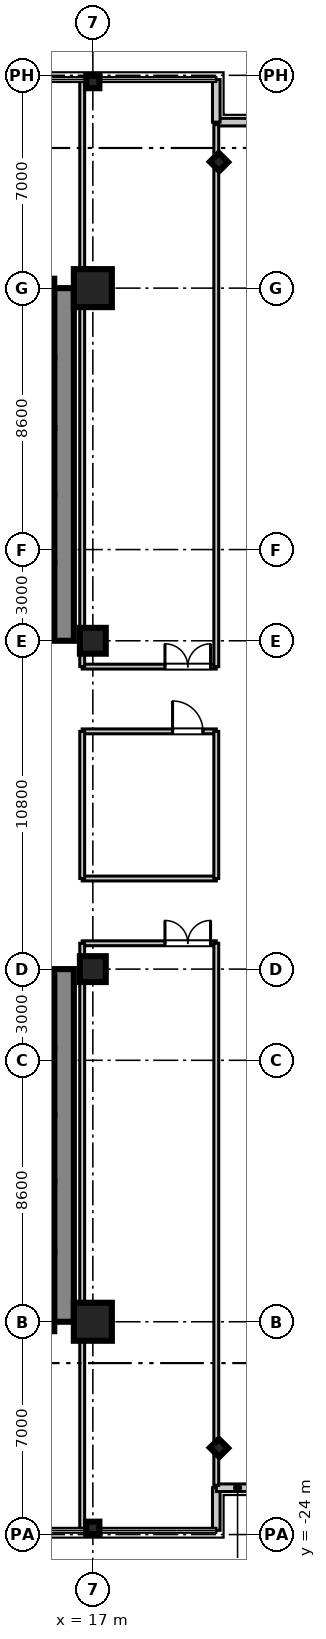
"""IFC4 building model, lengths in metres.
Left out: names, types, materials, properties, quantities, classifications, styles, units other than length and angle.
Written with IfcOpenShell. Run it as: python <this file> out.ifc"""

import sys

from ifc_helpers import new_model, si_unit, direction, frame, frame_2d, origin, origin_2d, place, context, subcontext, project, spatial, rectangle, i_section, extrude, source, transform, mapped, element, fill, save


model = new_model("IFC4")
c1 = context("Model", 3, precision=1e-05, world=origin(), true_north=direction((0.0, 1.0)))
c2 = subcontext(c1, "Body", "Model", "MODEL_VIEW")
j1 = project(units=[si_unit("LENGTHUNIT", "METRE"), si_unit("PLANEANGLEUNIT", "RADIAN")], contexts=[c1])
p1 = place(None, origin())
s1 = spatial("IfcSite", under=j1, at=p1, CompositionType="ELEMENT")
p2 = place(p1, origin())
s2 = spatial("IfcBuilding", under=s1, at=p2, CompositionType="ELEMENT")
p3 = place(p2, frame((0.0, 0.0, 110.2)))
s3 = spatial("IfcBuildingStorey", under=s2, at=p3, CompositionType="ELEMENT", Elevation=110.2)
m1 = source(origin(), c2, "Body", "SweptSolid", [
    extrude(rectangle(XDim=1.25, YDim=1.25, at=origin_2d()), origin(), (0.0, 0.0, 1.0), 3.605),
])
p4 = place(p3, frame((17.0, -17.0, 0.0), z_axis=(0.0, 0.0, 1.0), x_axis=(1.0, 0.0, 0.0)))
e1 = element("IfcColumn", 1, at=p4, inside=s3, PredefinedType="COLUMN", context=c2, shape_type="MappedRepresentation", body=[
    mapped(m1, transform((0.0, 0.0, 0.0), scale=1.0)),
])
m2 = source(origin(), c2, "Body", "SweptSolid", [
    extrude(rectangle(XDim=0.85, YDim=0.85, at=origin_2d()), origin(), (0.0, 0.0, 1.0), 3.605),
])
for number, where, z_axis, x_axis in (
    (2, (17.0, -5.4, 0.0), (0.0, 0.0, 1.0), (1.0, 0.0, 0.0)),
    (3, (17.0, 5.4, 0.0), (0.0, 0.0, 1.0), (1.0, 0.0, 0.0)),
):
    element("IfcColumn", number, at=place(p3, frame(where, z_axis=z_axis, x_axis=x_axis)), inside=s3, PredefinedType="PILASTER", context=c2, shape_type="MappedRepresentation", body=[
        mapped(m2, transform((0.0, 0.0, 0.0), scale=1.0)),
    ])
p5 = place(p3, frame((17.0, 17.0, 0.0), z_axis=(0.0, 0.0, 1.0), x_axis=(1.0, 0.0, 0.0)))
e4 = element("IfcColumn", 4, at=p5, inside=s3, PredefinedType="COLUMN", context=c2, shape_type="MappedRepresentation", body=[
    mapped(m1, transform((0.0, 0.0, 0.0), scale=1.0)),
])
m3 = source(origin(), c2, "Body", "SweptSolid", [
    extrude(i_section(OverallWidth=0.409, OverallDepth=0.43, WebThickness=0.021, FlangeThickness=0.034, at=origin_2d()), origin(), (0.0, 0.0, 1.0), 3.605),
])
for number, where, z_axis, x_axis in (
    (5, (17.0, -23.78, 0.0), (0.0, 0.0, 1.0), (0.0, 1.0, 0.0)),
    (6, (17.0, 23.78, 0.0), (0.0, 0.0, 1.0), (0.0, 1.0, 0.0)),
    (7, (21.15, -21.15, 0.0), (0.0, 0.0, 1.0), (0.707, 0.707, 0.0)),
    (8, (21.15, 21.15, 0.0), (0.0, 0.0, 1.0), (0.707, 0.707, 0.0)),
):
    element("IfcColumn", number, at=place(p3, frame(where, z_axis=z_axis, x_axis=x_axis)), inside=s3, PredefinedType="COLUMN", context=c2, shape_type="MappedRepresentation", body=[
        mapped(m3, transform((0.0, 0.0, 0.0), scale=1.0)),
    ])
m4 = source(origin(), c2, "Body", "SweptSolid", [
    extrude(rectangle(XDim=11.6, YDim=0.65, at=frame_2d((5.8, 0.0))), origin(), (0.0, 0.0, 1.0), 3.38),
])
for number, where, z_axis, x_axis in (
    (9, (16.05, 5.4, 0.0), (0.0, 0.0, 1.0), (0.0, 1.0, 0.0)),
    (10, (16.05, -17.0, 0.0), (0.0, 0.0, 1.0), (0.0, 1.0, 0.0)),
):
    element("IfcWall", number, at=place(p3, frame(where, z_axis=z_axis, x_axis=x_axis)), inside=s3, PredefinedType="SHEAR", context=c2, shape_type="MappedRepresentation", body=[
        mapped(m4, transform((0.0, 0.0, 0.0), scale=1.0)),
    ])
m5 = source(origin(), c2, "Body", "SweptSolid", [
    extrude(rectangle(XDim=2.36, YDim=0.22, at=frame_2d((1.18, 0.0))), origin(), (0.0, 0.0, 1.0), 3.38),
])
p6 = place(p3, frame((15.62, 5.64, 0.0), z_axis=(0.0, 0.0, 1.0), x_axis=(0.0, 1.0, 0.0)))
e11 = element("IfcWall", 11, at=p6, inside=s3, PredefinedType="SHEAR", context=c2, shape_type="MappedRepresentation", body=[
    mapped(m5, transform((0.0, 0.0, 0.0), scale=1.0)),
])
m6 = source(origin(), c2, "Body", "SweptSolid", [
    extrude(rectangle(XDim=2.2, YDim=0.22, at=frame_2d((1.1, 0.0))), origin(), (0.0, 0.0, 1.0), 3.38),
])
for number, where, z_axis, x_axis in (
    (12, (15.62, 8.0, 0.0), (0.0, 0.0, 1.0), (0.0, 1.0, 0.0)),
    (13, (15.62, 10.2, 0.0), (0.0, 0.0, 1.0), (0.0, 1.0, 0.0)),
):
    element("IfcWall", number, at=place(p3, frame(where, z_axis=z_axis, x_axis=x_axis)), inside=s3, PredefinedType="SHEAR", context=c2, shape_type="MappedRepresentation", body=[
        mapped(m6, transform((0.0, 0.0, 0.0), scale=1.0)),
    ])
m7 = source(origin(), c2, "Body", "SweptSolid", [
    extrude(rectangle(XDim=2.3, YDim=0.22, at=frame_2d((1.15, 0.0))), origin(), (0.0, 0.0, 1.0), 3.38),
])
p7 = place(p3, frame((15.62, 12.4, 0.0), z_axis=(0.0, 0.0, 1.0), x_axis=(0.0, 1.0, 0.0)))
e14 = element("IfcWall", 14, at=p7, inside=s3, PredefinedType="SHEAR", context=c2, shape_type="MappedRepresentation", body=[
    mapped(m7, transform((0.0, 0.0, 0.0), scale=1.0)),
])
p8 = place(p3, frame((15.62, -8.0, 0.0), z_axis=(0.0, 0.0, 1.0), x_axis=(0.0, 1.0, 0.0)))
e15 = element("IfcWall", 15, at=p8, inside=s3, PredefinedType="SHEAR", context=c2, shape_type="MappedRepresentation", body=[
    mapped(m5, transform((0.0, 0.0, 0.0), scale=1.0)),
])
for number, where, z_axis, x_axis in (
    (16, (15.62, -10.2, 0.0), (0.0, 0.0, 1.0), (0.0, 1.0, 0.0)),
    (17, (15.62, -12.4, 0.0), (0.0, 0.0, 1.0), (0.0, 1.0, 0.0)),
):
    element("IfcWall", number, at=place(p3, frame(where, z_axis=z_axis, x_axis=x_axis)), inside=s3, PredefinedType="SHEAR", context=c2, shape_type="MappedRepresentation", body=[
        mapped(m6, transform((0.0, 0.0, 0.0), scale=1.0)),
    ])
p9 = place(p3, frame((15.62, -14.7, 0.0), z_axis=(0.0, 0.0, 1.0), x_axis=(0.0, 1.0, 0.0)))
e18 = element("IfcWall", 18, at=p9, inside=s3, PredefinedType="SHEAR", context=c2, shape_type="MappedRepresentation", body=[
    mapped(m7, transform((0.0, 0.0, 0.0), scale=1.0)),
])
m8 = source(origin(), c2, "Body", "SweptSolid", [
    extrude(rectangle(XDim=2.61, YDim=0.22, at=frame_2d((1.305, 0.0))), origin(), (0.0, 0.0, 1.0), 3.38),
])
for number, where, z_axis, x_axis in (
    (19, (15.62, 14.7, 0.0), (0.0, 0.0, 1.0), (0.0, 1.0, 0.0)),
    (20, (15.62, -17.31, 0.0), (0.0, 0.0, 1.0), (0.0, 1.0, 0.0)),
):
    element("IfcWall", number, at=place(p3, frame(where, z_axis=z_axis, x_axis=x_axis)), inside=s3, PredefinedType="SHEAR", context=c2, shape_type="MappedRepresentation", body=[
        mapped(m8, transform((0.0, 0.0, 0.0), scale=1.0)),
    ])
m9 = source(origin(), c2, "Body", "SweptSolid", [
    extrude(rectangle(XDim=1.4, YDim=0.25, at=frame_2d((0.7, 0.0))), origin(), (0.0, 0.0, 1.0), 3.38),
])
p10 = place(p3, frame((21.06, -23.86, 0.0), z_axis=(0.0, 0.0, 1.0), x_axis=(0.0, 1.0, 0.0)))
e21 = element("IfcWall", 21, at=p10, inside=s3, PredefinedType="STANDARD", context=c2, shape_type="MappedRepresentation", body=[
    mapped(m9, transform((0.0, 0.0, 0.0), scale=1.0)),
])
m10 = source(origin(), c2, "Body", "SweptSolid", [
    extrude(rectangle(XDim=1.4, YDim=0.25, at=frame_2d((0.7, 0.0))), origin(), (0.0, 0.0, 1.0), 3.38),
])
for number, where, z_axis, x_axis in (
    (22, (21.06, -22.46, 0.0), (0.0, 0.0, 1.0), (1.0, 0.0, 0.0)),
    (23, (21.06, 22.46, 0.0), (0.0, 0.0, 1.0), (1.0, 0.0, 0.0)),
):
    element("IfcWall", number, at=place(p3, frame(where, z_axis=z_axis, x_axis=x_axis)), inside=s3, PredefinedType="STANDARD", context=c2, shape_type="MappedRepresentation", body=[
        mapped(m10, transform((0.0, 0.0, 0.0), scale=1.0)),
    ])
p11 = place(p3, frame((21.06, 22.46, 0.0), z_axis=(0.0, 0.0, 1.0), x_axis=(0.0, 1.0, 0.0)))
e24 = element("IfcWall", 24, at=p11, inside=s3, PredefinedType="STANDARD", context=c2, shape_type="MappedRepresentation", body=[
    mapped(m9, transform((0.0, 0.0, 0.0), scale=1.0)),
])
m11 = source(origin(), c2, "Body", "SweptSolid", [
    extrude(rectangle(XDim=4.41, YDim=0.16, at=frame_2d((2.205, 0.0))), origin(), (0.0, 0.0, 1.0), 2.72),
])
p12 = place(p3, frame((16.65, 4.55, 0.0), z_axis=(0.0, 0.0, 1.0), x_axis=(1.0, 0.0, 0.0)))
e25 = element("IfcWall", 25, at=p12, inside=s3, PredefinedType="PARTITIONING", context=c2, shape_type="MappedRepresentation", body=[
    mapped(m11, transform((0.0, 0.0, 0.0), scale=1.0)),
])
p13 = place(p12, frame((2.722, 0.0, 0.0)))
e26 = element("IfcOpeningElement", 26, at=p13, cuts=e25, PredefinedType="OPENING", context=c2, shape_type="SweptSolid", body=[
    extrude(rectangle(XDim=1.5, YDim=2.15, at=frame_2d((0.75, 1.075))), frame((0.0, 0.09, 0.0), z_axis=(0.0, -1.0, 0.0), x_axis=(1.0, 0.0, 0.0)), (0.0, 0.0, 1.0), 0.18),
])
m12 = source(origin(), c2, "Body", "SweptSolid", [
    extrude(rectangle(XDim=19.25, YDim=0.16, at=frame_2d((9.625, 0.0))), origin(), (0.0, 0.0, 1.0), 2.72),
])
p14 = place(p3, frame((16.65, 4.55, 0.0), z_axis=(0.0, 0.0, 1.0), x_axis=(0.0, 1.0, 0.0)))
e27 = element("IfcWall", 27, at=p14, inside=s3, PredefinedType="PARTITIONING", context=c2, shape_type="MappedRepresentation", body=[
    mapped(m12, transform((0.0, 0.0, 0.0), scale=1.0)),
])
m13 = source(origin(), c2, "Body", "SweptSolid", [
    extrude(rectangle(XDim=17.83, YDim=0.16, at=frame_2d((8.915, 0.0))), origin(), (0.0, 0.0, 1.0), 2.72),
])
p15 = place(p3, frame((21.06, 4.55, 0.0), z_axis=(0.0, 0.0, 1.0), x_axis=(0.0, 1.0, 0.0)))
e28 = element("IfcWall", 28, at=p15, inside=s3, PredefinedType="PARTITIONING", context=c2, shape_type="MappedRepresentation", body=[
    mapped(m13, transform((0.0, 0.0, 0.0), scale=1.0)),
])
p16 = place(p3, frame((16.65, -4.55, 0.0), z_axis=(0.0, 0.0, 1.0), x_axis=(1.0, 0.0, 0.0)))
e29 = element("IfcWall", 29, at=p16, inside=s3, PredefinedType="PARTITIONING", context=c2, shape_type="MappedRepresentation", body=[
    mapped(m11, transform((0.0, 0.0, 0.0), scale=1.0)),
])
p17 = place(p16, frame((2.722, 0.0, 0.0)))
e30 = element("IfcOpeningElement", 30, at=p17, cuts=e29, PredefinedType="OPENING", context=c2, shape_type="SweptSolid", body=[
    extrude(rectangle(XDim=1.5, YDim=2.15, at=frame_2d((0.75, 1.075))), frame((0.0, 0.09, 0.0), z_axis=(0.0, -1.0, 0.0), x_axis=(1.0, 0.0, 0.0)), (0.0, 0.0, 1.0), 0.18),
])
p18 = place(p3, frame((16.65, -23.8, 0.0), z_axis=(0.0, 0.0, 1.0), x_axis=(0.0, 1.0, 0.0)))
e31 = element("IfcWall", 31, at=p18, inside=s3, PredefinedType="PARTITIONING", context=c2, shape_type="MappedRepresentation", body=[
    mapped(m12, transform((0.0, 0.0, 0.0), scale=1.0)),
])
p19 = place(p3, frame((21.06, -22.38, 0.0), z_axis=(0.0, 0.0, 1.0), x_axis=(0.0, 1.0, 0.0)))
e32 = element("IfcWall", 32, at=p19, inside=s3, PredefinedType="PARTITIONING", context=c2, shape_type="MappedRepresentation", body=[
    mapped(m13, transform((0.0, 0.0, 0.0), scale=1.0)),
])
p20 = place(p3, frame((16.65, -2.42, 0.0), z_axis=(0.0, 0.0, 1.0), x_axis=(1.0, 0.0, 0.0)))
e33 = element("IfcWall", 33, at=p20, inside=s3, PredefinedType="PARTITIONING", context=c2, shape_type="MappedRepresentation", body=[
    mapped(m11, transform((0.0, 0.0, 0.0), scale=1.0)),
])
p21 = place(p3, frame((16.65, 2.42, 0.0), z_axis=(0.0, 0.0, 1.0), x_axis=(1.0, 0.0, 0.0)))
e34 = element("IfcWall", 34, at=p21, inside=s3, PredefinedType="PARTITIONING", context=c2, shape_type="MappedRepresentation", body=[
    mapped(m11, transform((0.0, 0.0, 0.0), scale=1.0)),
])
p22 = place(p21, frame((2.972, 0.0, 0.0)))
e35 = element("IfcOpeningElement", 35, at=p22, cuts=e34, PredefinedType="OPENING", context=c2, shape_type="SweptSolid", body=[
    extrude(rectangle(XDim=1.0, YDim=2.1, at=frame_2d((0.5, 1.05))), frame((0.0, 0.09, 0.0), z_axis=(0.0, -1.0, 0.0), x_axis=(1.0, 0.0, 0.0)), (0.0, 0.0, 1.0), 0.18),
])
m14 = source(origin(), c2, "Body", "SweptSolid", [
    extrude(rectangle(XDim=4.84, YDim=0.16, at=frame_2d((2.42, 0.0))), origin(), (0.0, 0.0, 1.0), 2.72),
])
for number, where, z_axis, x_axis in (
    (36, (16.65, -2.42, 0.0), (0.0, 0.0, 1.0), (0.0, 1.0, 0.0)),
    (37, (21.06, -2.42, 0.0), (0.0, 0.0, 1.0), (0.0, 1.0, 0.0)),
):
    element("IfcWall", number, at=place(p3, frame(where, z_axis=z_axis, x_axis=x_axis)), inside=s3, PredefinedType="PARTITIONING", context=c2, shape_type="MappedRepresentation", body=[
        mapped(m14, transform((0.0, 0.0, 0.0), scale=1.0)),
    ])
m15 = source(origin(), c2, "Body", "SweptSolid", [
    extrude(rectangle(XDim=1.5, YDim=2.15, at=frame_2d((0.75, 1.075))), frame((0.0, 0.025, 0.0), z_axis=(0.0, -1.0, 0.0), x_axis=(1.0, 0.0, 0.0)), (0.0, 0.0, 1.0), 0.05),
])
p23 = place(p13, origin())
e38 = element("IfcDoor", 38, at=p23, inside=s3, OperationType="DOUBLE_DOOR_SINGLE_SWING", PredefinedType="DOOR", context=c2, shape_type="MappedRepresentation", body=[
    mapped(m15, transform((0.0, 0.0, 0.0), scale=1.0)),
])
fill(e26, e38)
p24 = place(p17, frame((1.5, 0.0, 0.0), z_axis=(0.0, 0.0, 1.0), x_axis=(-1.0, 0.0, 0.0)))
e39 = element("IfcDoor", 39, at=p24, inside=s3, OperationType="DOUBLE_DOOR_SINGLE_SWING", PredefinedType="DOOR", context=c2, shape_type="MappedRepresentation", body=[
    mapped(m15, transform((0.0, 0.0, 0.0), scale=1.0)),
])
fill(e30, e39)
m16 = source(origin(), c2, "Body", "SweptSolid", [
    extrude(rectangle(XDim=1.0, YDim=2.1, at=frame_2d((0.5, 1.05))), frame((0.0, 0.025, 0.0), z_axis=(0.0, -1.0, 0.0), x_axis=(1.0, 0.0, 0.0)), (0.0, 0.0, 1.0), 0.05),
])
p25 = place(p22, frame((1.0, 0.0, 0.0), z_axis=(0.0, 0.0, 1.0), x_axis=(-1.0, 0.0, 0.0)))
e40 = element("IfcDoor", 40, at=p25, inside=s3, OperationType="SINGLE_SWING_LEFT", PredefinedType="DOOR", context=c2, shape_type="MappedRepresentation", body=[
    mapped(m16, transform((0.0, 0.0, 0.0), scale=1.0)),
])
fill(e35, e40)
save(model, sys.argv[1])
